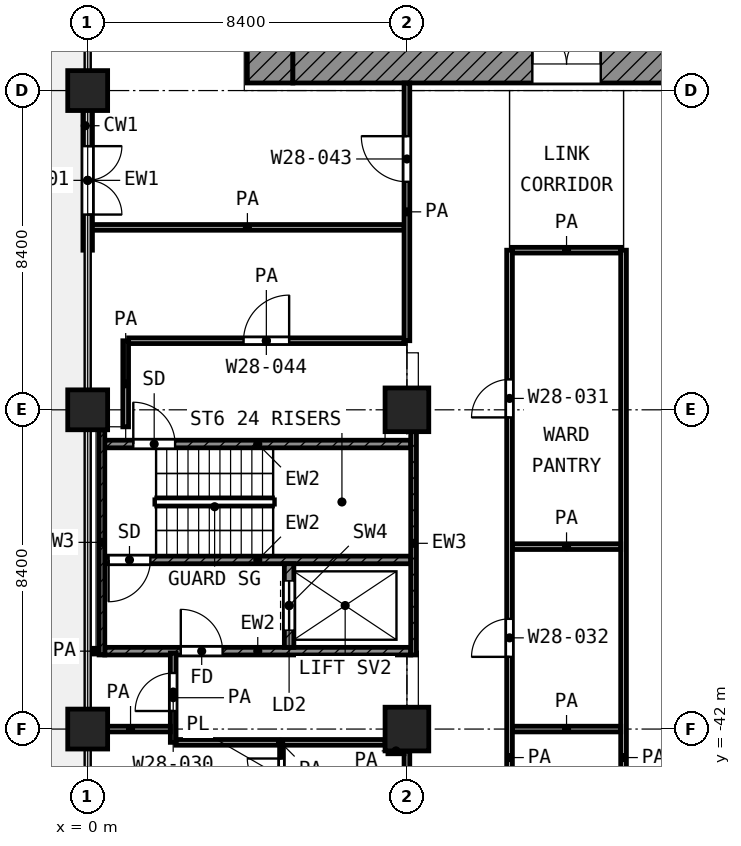
"""IFC4 building model, lengths in metres.
Left out: names, types, materials, properties, quantities, classifications, styles, units other than length and angle.
Written with IfcOpenShell. Run it as: python <this file> out.ifc"""

import sys

from ifc_helpers import new_model, si_unit, direction, frame, frame_2d, origin, origin_2d, place, context, subcontext, project, spatial, rectangle, extrude, element, fill, save


model = new_model("IFC4")
c1 = context("Model", 3, precision=1e-05, world=origin(), true_north=direction((0.0, 1.0)))
c2 = subcontext(c1, "Body", "Model", "MODEL_VIEW")
j1 = project(units=[si_unit("LENGTHUNIT", "METRE"), si_unit("PLANEANGLEUNIT", "RADIAN")], contexts=[c1])
p1 = place(None, origin())
s1 = spatial("IfcSite", under=j1, at=p1, CompositionType="ELEMENT")
p2 = place(p1, origin())
s2 = spatial("IfcBuilding", under=s1, at=p2, CompositionType="ELEMENT")
p3 = place(p2, frame((0.0, 0.0, 124.0)))
s3 = spatial("IfcBuildingStorey", under=s2, at=p3, CompositionType="ELEMENT", Elevation=124.0)
for number, where, z_axis, x_axis in (
    (1, (0.0, -25.2, 0.0), (0.0, 0.0, 1.0), (1.0, 0.0, 0.0)),
    (2, (0.0, -33.6, 0.0), (0.0, 0.0, 1.0), (1.0, 0.0, 0.0)),
):
    element("IfcColumn", number, at=place(p3, frame(where, z_axis=z_axis, x_axis=x_axis)), inside=s3, PredefinedType="COLUMN", context=c2, shape_type="SweptSolid", body=[
        extrude(rectangle(XDim=1.05, YDim=1.05, at=origin_2d()), origin(), (0.0, 0.0, 1.0), 4.2),
    ])
p4 = place(p3, frame((8.4, -33.6, 0.0), z_axis=(0.0, 0.0, 1.0), x_axis=(1.0, 0.0, 0.0)))
e3 = element("IfcColumn", 3, at=p4, inside=s3, PredefinedType="COLUMN", context=c2, shape_type="SweptSolid", body=[
    extrude(rectangle(XDim=1.15, YDim=1.15, at=origin_2d()), origin(), (0.0, 0.0, 1.0), 4.2),
])
p5 = place(p3, frame((0.0, -42.0, 0.0), z_axis=(0.0, 0.0, 1.0), x_axis=(1.0, 0.0, 0.0)))
e4 = element("IfcColumn", 4, at=p5, inside=s3, PredefinedType="COLUMN", context=c2, shape_type="SweptSolid", body=[
    extrude(rectangle(XDim=1.05, YDim=1.05, at=origin_2d()), origin(), (0.0, 0.0, 1.0), 4.2),
])
p6 = place(p3, frame((8.4, -42.0, 0.0), z_axis=(0.0, 0.0, 1.0), x_axis=(1.0, 0.0, 0.0)))
e5 = element("IfcColumn", 5, at=p6, inside=s3, PredefinedType="COLUMN", context=c2, shape_type="SweptSolid", body=[
    extrude(rectangle(XDim=1.15, YDim=1.15, at=origin_2d()), origin(), (0.0, 0.0, 1.0), 4.2),
])
p7 = place(p3, frame((0.0, -25.725, 0.0), z_axis=(0.0, 0.0, 1.0), x_axis=(0.0, -1.0, 0.0)))
e6 = element("IfcWall", 6, at=p7, inside=s3, PredefinedType="SOLIDWALL", context=c2, shape_type="SweptSolid", body=[
    extrude(rectangle(XDim=3.675, YDim=0.25, at=frame_2d((1.837, 0.0))), origin(), (0.0, 0.0, 1.0), 3.48),
])
p8 = place(p7, frame((0.938, 0.0, 0.0)))
e7 = element("IfcOpeningElement", 7, at=p8, cuts=e6, PredefinedType="OPENING", context=c2, shape_type="SweptSolid", body=[
    extrude(rectangle(XDim=1.8, YDim=2.1, at=frame_2d((0.9, 1.05))), frame((0.0, 0.135, 0.0), z_axis=(0.0, -1.0, 0.0), x_axis=(1.0, 0.0, 0.0)), (0.0, 0.0, 1.0), 0.27),
])
p9 = place(p3, frame((4.8, -25.0, 0.0), z_axis=(0.0, 0.0, 1.0), x_axis=(0.0, 1.0, 0.0)))
e8 = element("IfcWall", 8, at=p9, inside=s3, PredefinedType="SHEAR", context=c2, shape_type="SweptSolid", body=[
    extrude(rectangle(XDim=19.6, YDim=1.2, at=frame_2d((9.8, 0.0))), origin(), (0.0, 0.0, 1.0), 3.6),
])
p10 = place(p9, frame((11.45, 0.0, 0.0)))
e9 = element("IfcOpeningElement", 9, at=p10, cuts=e8, PredefinedType="OPENING", context=c2, shape_type="SweptSolid", body=[
    extrude(rectangle(XDim=1.1, YDim=2.1, at=frame_2d((0.55, 1.05))), frame((0.0, 0.61, 0.0), z_axis=(0.0, -1.0, 0.0), x_axis=(1.0, 0.0, 0.0)), (0.0, 0.0, 1.0), 1.22),
])
p11 = place(p9, frame((2.15, 0.0, 0.0)))
e10 = element("IfcOpeningElement", 10, at=p11, cuts=e8, PredefinedType="OPENING", context=c2, shape_type="SweptSolid", body=[
    extrude(rectangle(XDim=1.1, YDim=2.1, at=frame_2d((0.55, 1.05))), frame((0.0, 0.61, 0.0), z_axis=(0.0, -1.0, 0.0), x_axis=(1.0, 0.0, 0.0)), (0.0, 0.0, 1.0), 1.22),
])
p12 = place(p3, frame((5.4, -24.5, 0.0), z_axis=(0.0, 0.0, 1.0), x_axis=(1.0, 0.0, 0.0)))
e11 = element("IfcWall", 11, at=p12, inside=s3, PredefinedType="SHEAR", context=c2, shape_type="SweptSolid", body=[
    extrude(rectangle(XDim=18.6, YDim=1.0, at=frame_2d((9.3, 0.0))), origin(), (0.0, 0.0, 1.0), 3.6),
])
p13 = place(p12, frame((6.3, 0.0, 0.0)))
e12 = element("IfcOpeningElement", 12, at=p13, cuts=e11, PredefinedType="OPENING", context=c2, shape_type="SweptSolid", body=[
    extrude(rectangle(XDim=1.8, YDim=2.1, at=frame_2d((0.9, 1.05))), frame((0.0, 0.51, 0.0), z_axis=(0.0, -1.0, 0.0), x_axis=(1.0, 0.0, 0.0)), (0.0, 0.0, 1.0), 1.02),
])
p14 = place(p3, frame((0.375, -40.05, 0.0), z_axis=(0.0, 0.0, 1.0), x_axis=(0.0, 1.0, 0.0)))
e13 = element("IfcWall", 13, at=p14, inside=s3, PredefinedType="SHEAR", context=c2, shape_type="SweptSolid", body=[
    extrude(rectangle(XDim=5.925, YDim=0.15, at=frame_2d((2.962, 0.0))), origin(), (0.0, 0.0, 1.0), 3.6),
])
p15 = place(p3, frame((8.575, -40.05, 0.0), z_axis=(0.0, 0.0, 1.0), x_axis=(0.0, 1.0, 0.0)))
e14 = element("IfcWall", 14, at=p15, inside=s3, PredefinedType="SHEAR", context=c2, shape_type="SweptSolid", body=[
    extrude(rectangle(XDim=5.875, YDim=0.15, at=frame_2d((2.938, 0.0))), origin(), (0.0, 0.0, 1.0), 3.6),
])
p16 = place(p3, frame((0.45, -34.5, 0.0), z_axis=(0.0, 0.0, 1.0), x_axis=(1.0, 0.0, 0.0)))
e15 = element("IfcWall", 15, at=p16, inside=s3, PredefinedType="SHEAR", context=c2, shape_type="SweptSolid", body=[
    extrude(rectangle(XDim=8.05, YDim=0.2, at=frame_2d((4.025, 0.0))), origin(), (0.0, 0.0, 1.0), 3.6),
])
p17 = place(p16, frame((0.75, 0.0, 0.0)))
e16 = element("IfcOpeningElement", 16, at=p17, cuts=e15, PredefinedType="OPENING", context=c2, shape_type="SweptSolid", body=[
    extrude(rectangle(XDim=1.1, YDim=2.1, at=frame_2d((0.55, 1.05))), frame((0.0, 0.11, 0.0), z_axis=(0.0, -1.0, 0.0), x_axis=(1.0, 0.0, 0.0)), (0.0, 0.0, 1.0), 0.22),
])
p18 = place(p3, frame((0.45, -37.55, 0.0), z_axis=(0.0, 0.0, 1.0), x_axis=(1.0, 0.0, 0.0)))
e17 = element("IfcWall", 17, at=p18, inside=s3, PredefinedType="SHEAR", context=c2, shape_type="SweptSolid", body=[
    extrude(rectangle(XDim=8.05, YDim=0.2, at=frame_2d((4.025, 0.0))), origin(), (0.0, 0.0, 1.0), 3.6),
])
p19 = place(p18, frame((0.1, 0.0, 0.0)))
e18 = element("IfcOpeningElement", 18, at=p19, cuts=e17, PredefinedType="OPENING", context=c2, shape_type="SweptSolid", body=[
    extrude(rectangle(XDim=1.1, YDim=2.1, at=frame_2d((0.55, 1.05))), frame((0.0, 0.11, 0.0), z_axis=(0.0, -1.0, 0.0), x_axis=(1.0, 0.0, 0.0)), (0.0, 0.0, 1.0), 0.22),
])
p20 = place(p3, frame((0.45, -39.95, 0.0), z_axis=(0.0, 0.0, 1.0), x_axis=(1.0, 0.0, 0.0)))
e19 = element("IfcWall", 19, at=p20, inside=s3, PredefinedType="SHEAR", context=c2, shape_type="SweptSolid", body=[
    extrude(rectangle(XDim=8.05, YDim=0.2, at=frame_2d((4.025, 0.0))), origin(), (0.0, 0.0, 1.0), 3.6),
])
p21 = place(p20, frame((2.0, 0.0, 0.0)))
e20 = element("IfcOpeningElement", 20, at=p21, cuts=e19, PredefinedType="OPENING", context=c2, shape_type="SweptSolid", body=[
    extrude(rectangle(XDim=1.1, YDim=2.1, at=frame_2d((0.55, 1.05))), frame((0.0, 0.11, 0.0), z_axis=(0.0, -1.0, 0.0), x_axis=(1.0, 0.0, 0.0)), (0.0, 0.0, 1.0), 0.22),
])
p22 = place(p3, frame((5.3, -39.85, 0.0), z_axis=(0.0, 0.0, 1.0), x_axis=(0.0, 1.0, 0.0)))
e21 = element("IfcWall", 21, at=p22, inside=s3, PredefinedType="SHEAR", context=c2, shape_type="SweptSolid", body=[
    extrude(rectangle(XDim=2.2, YDim=0.25, at=frame_2d((1.1, 0.0))), origin(), (0.0, 0.0, 1.0), 3.6),
])
p23 = place(p22, frame((0.45, 0.0, 0.0)))
e22 = element("IfcOpeningElement", 22, at=p23, cuts=e21, PredefinedType="OPENING", context=c2, shape_type="SweptSolid", body=[
    extrude(rectangle(XDim=1.3, YDim=2.1, at=frame_2d((0.65, 1.05))), frame((0.0, 0.135, 0.0), z_axis=(0.0, -1.0, 0.0), x_axis=(1.0, 0.0, 0.0)), (0.0, 0.0, 1.0), 0.27),
])
p24 = place(p3, frame((5.1, -44.1, 0.0), z_axis=(0.0, 0.0, 1.0), x_axis=(0.0, 1.0, 0.0)))
e23 = element("IfcWall", 23, at=p24, inside=s3, PredefinedType="PARTITIONING", context=c2, shape_type="SweptSolid", body=[
    extrude(rectangle(XDim=1.675, YDim=0.1, at=frame_2d((0.837, 0.0))), origin(), (0.0, 0.0, 1.0), 3.6),
])
p25 = place(p24, frame((0.425, 0.0, 0.0)))
e24 = element("IfcOpeningElement", 24, at=p25, cuts=e23, PredefinedType="OPENING", context=c2, shape_type="SweptSolid", body=[
    extrude(rectangle(XDim=0.9, YDim=2.1, at=frame_2d((0.45, 1.05))), frame((0.0, 0.06, 0.0), z_axis=(0.0, -1.0, 0.0), x_axis=(1.0, 0.0, 0.0)), (0.0, 0.0, 1.0), 0.12),
])
p26 = place(p3, frame((7.9, -42.575, 0.0), z_axis=(0.0, 0.0, 1.0), x_axis=(1.0, 0.0, 0.0)))
e25 = element("IfcWall", 25, at=p26, inside=s3, PredefinedType="PARTITIONING", context=c2, shape_type="SweptSolid", body=[
    extrude(rectangle(XDim=0.425, YDim=0.15, at=frame_2d((0.212, 0.0))), origin(), (0.0, 0.0, 1.0), 3.6),
])
p27 = place(p3, frame((2.325, -42.35, 0.0), z_axis=(0.0, 0.0, 1.0), x_axis=(1.0, 0.0, 0.0)))
e26 = element("IfcWall", 26, at=p27, inside=s3, PredefinedType="PARTITIONING", context=c2, shape_type="SweptSolid", body=[
    extrude(rectangle(XDim=5.498, YDim=0.15, at=frame_2d((2.749, 0.0))), origin(), (0.0, 0.0, 1.0), 3.6),
])
p28 = place(p3, frame((0.08, -42.0, 0.0), z_axis=(0.0, 0.0, 1.0), x_axis=(1.0, 0.0, 0.0)))
e27 = element("IfcWall", 27, at=p28, inside=s3, PredefinedType="PARTITIONING", context=c2, shape_type="SweptSolid", body=[
    extrude(rectangle(XDim=2.095, YDim=0.15, at=frame_2d((1.047, 0.0))), origin(), (0.0, 0.0, 1.0), 3.6),
])
p29 = place(p3, frame((11.175, -42.0, 0.0), z_axis=(0.0, 0.0, 1.0), x_axis=(1.0, 0.0, 0.0)))
e28 = element("IfcWall", 28, at=p29, inside=s3, PredefinedType="PARTITIONING", context=c2, shape_type="SweptSolid", body=[
    extrude(rectangle(XDim=2.85, YDim=0.15, at=frame_2d((1.425, 0.0))), origin(), (0.0, 0.0, 1.0), 3.6),
])
p30 = place(p3, frame((0.08, -39.95, 0.0), z_axis=(0.0, 0.0, 1.0), x_axis=(1.0, 0.0, 0.0)))
e29 = element("IfcWall", 29, at=p30, inside=s3, PredefinedType="PARTITIONING", context=c2, shape_type="SweptSolid", body=[
    extrude(rectangle(XDim=0.19, YDim=0.15, at=frame_2d((0.095, 0.0))), origin(), (0.0, 0.0, 1.0), 3.6),
])
p31 = place(p3, frame((11.175, -37.2, 0.0), z_axis=(0.0, 0.0, 1.0), x_axis=(1.0, 0.0, 0.0)))
e30 = element("IfcWall", 30, at=p31, inside=s3, PredefinedType="PARTITIONING", context=c2, shape_type="SweptSolid", body=[
    extrude(rectangle(XDim=2.85, YDim=0.15, at=frame_2d((1.425, 0.0))), origin(), (0.0, 0.0, 1.0), 3.6),
])
p32 = place(p3, frame((1.077, -31.782, 0.0), z_axis=(0.0, 0.0, 1.0), x_axis=(1.0, 0.0, 0.0)))
e31 = element("IfcWall", 31, at=p32, inside=s3, PredefinedType="PARTITIONING", context=c2, shape_type="SweptSolid", body=[
    extrude(rectangle(XDim=7.248, YDim=0.15, at=frame_2d((3.624, 0.0))), origin(), (0.0, 0.0, 1.0), 3.6),
])
p33 = place(p32, frame((3.024, 0.0, 0.0)))
e32 = element("IfcOpeningElement", 32, at=p33, cuts=e31, PredefinedType="OPENING", context=c2, shape_type="SweptSolid", body=[
    extrude(rectangle(XDim=1.2, YDim=2.1, at=frame_2d((0.6, 1.05))), frame((0.0, 0.085, 0.0), z_axis=(0.0, -1.0, 0.0), x_axis=(1.0, 0.0, 0.0)), (0.0, 0.0, 1.0), 0.17),
])
p34 = place(p3, frame((11.175, -29.4, 0.0), z_axis=(0.0, 0.0, 1.0), x_axis=(1.0, 0.0, 0.0)))
e33 = element("IfcWall", 33, at=p34, inside=s3, PredefinedType="PARTITIONING", context=c2, shape_type="SweptSolid", body=[
    extrude(rectangle(XDim=2.85, YDim=0.15, at=frame_2d((1.425, 0.0))), origin(), (0.0, 0.0, 1.0), 3.6),
])
p35 = place(p3, frame((0.08, -28.8, 0.0), z_axis=(0.0, 0.0, 1.0), x_axis=(1.0, 0.0, 0.0)))
e34 = element("IfcWall", 34, at=p35, inside=s3, PredefinedType="PARTITIONING", context=c2, shape_type="SweptSolid", body=[
    extrude(rectangle(XDim=8.245, YDim=0.15, at=frame_2d((4.123, 0.0))), origin(), (0.0, 0.0, 1.0), 3.6),
])
p36 = place(p3, frame((1.0, -34.048, 0.0), z_axis=(0.0, 0.0, 1.0), x_axis=(0.0, 1.0, 0.0)))
e35 = element("IfcWall", 35, at=p36, inside=s3, PredefinedType="PARTITIONING", context=c2, shape_type="SweptSolid", body=[
    extrude(rectangle(XDim=2.265, YDim=0.15, at=frame_2d((1.133, 0.0))), origin(), (0.0, 0.0, 1.0), 3.6),
])
p37 = place(p3, frame((2.25, -42.35, 0.0), z_axis=(0.0, 0.0, 1.0), x_axis=(0.0, 1.0, 0.0)))
e36 = element("IfcWall", 36, at=p37, inside=s3, PredefinedType="PARTITIONING", context=c2, shape_type="SweptSolid", body=[
    extrude(rectangle(XDim=2.35, YDim=0.15, at=frame_2d((1.175, 0.0))), origin(), (0.0, 0.0, 1.0), 3.6),
])
p38 = place(p37, frame((0.825, 0.0, 0.0)))
e37 = element("IfcOpeningElement", 37, at=p38, cuts=e36, PredefinedType="OPENING", context=c2, shape_type="SweptSolid", body=[
    extrude(rectangle(XDim=1.0, YDim=2.1, at=frame_2d((0.5, 1.05))), frame((0.0, 0.085, 0.0), z_axis=(0.0, -1.0, 0.0), x_axis=(1.0, 0.0, 0.0)), (0.0, 0.0, 1.0), 0.17),
])
p39 = place(p3, frame((8.4, -58.72, 0.0), z_axis=(0.0, 0.0, 1.0), x_axis=(0.0, 1.0, 0.0)))
e38 = element("IfcWall", 38, at=p39, inside=s3, PredefinedType="PARTITIONING", context=c2, shape_type="SweptSolid", body=[
    extrude(rectangle(XDim=16.145, YDim=0.15, at=frame_2d((8.073, 0.0))), origin(), (0.0, 0.0, 1.0), 2.7),
])
p40 = place(p39, frame((9.82, 0.0, 0.0)))
e39 = element("IfcOpeningElement", 39, at=p40, cuts=e38, PredefinedType="OPENING", context=c2, shape_type="SweptSolid", body=[
    extrude(rectangle(XDim=1.2, YDim=2.1, at=frame_2d((0.6, 1.05))), frame((0.0, 0.085, 0.0), z_axis=(0.0, -1.0, 0.0), x_axis=(1.0, 0.0, 0.0)), (0.0, 0.0, 1.0), 0.17),
])
p41 = place(p39, frame((11.92, 0.0, 0.0)))
e40 = element("IfcOpeningElement", 40, at=p41, cuts=e38, PredefinedType="OPENING", context=c2, shape_type="SweptSolid", body=[
    extrude(rectangle(XDim=1.2, YDim=2.1, at=frame_2d((0.6, 1.05))), frame((0.0, 0.085, 0.0), z_axis=(0.0, -1.0, 0.0), x_axis=(1.0, 0.0, 0.0)), (0.0, 0.0, 1.0), 0.17),
])
p42 = place(p39, frame((3.37, 0.0, 0.0)))
e41 = element("IfcOpeningElement", 41, at=p42, cuts=e38, PredefinedType="OPENING", context=c2, shape_type="SweptSolid", body=[
    extrude(rectangle(XDim=1.5, YDim=2.1, at=frame_2d((0.75, 1.05))), frame((0.0, 0.085, 0.0), z_axis=(0.0, -1.0, 0.0), x_axis=(1.0, 0.0, 0.0)), (0.0, 0.0, 1.0), 0.17),
])
p43 = place(p3, frame((8.4, -31.782, 0.0), z_axis=(0.0, 0.0, 1.0), x_axis=(0.0, 1.0, 0.0)))
e42 = element("IfcWall", 42, at=p43, inside=s3, PredefinedType="PARTITIONING", context=c2, shape_type="SweptSolid", body=[
    extrude(rectangle(XDim=6.782, YDim=0.15, at=frame_2d((3.391, 0.0))), origin(), (0.0, 0.0, 1.0), 3.6),
])
p44 = place(p43, frame((4.182, 0.0, 0.0)))
e43 = element("IfcOpeningElement", 43, at=p44, cuts=e42, PredefinedType="OPENING", context=c2, shape_type="SweptSolid", body=[
    extrude(rectangle(XDim=1.2, YDim=2.1, at=frame_2d((0.6, 1.05))), frame((0.0, 0.085, 0.0), z_axis=(0.0, -1.0, 0.0), x_axis=(1.0, 0.0, 0.0)), (0.0, 0.0, 1.0), 0.17),
])
p45 = place(p3, frame((11.1, -56.1, 0.0), z_axis=(0.0, 0.0, 1.0), x_axis=(0.0, 1.0, 0.0)))
e44 = element("IfcWall", 44, at=p45, inside=s3, PredefinedType="PARTITIONING", context=c2, shape_type="SweptSolid", body=[
    extrude(rectangle(XDim=26.7, YDim=0.15, at=frame_2d((13.35, 0.0))), origin(), (0.0, 0.0, 1.0), 3.6),
])
p46 = place(p45, frame((22.3, 0.0, 0.0)))
e45 = element("IfcOpeningElement", 45, at=p46, cuts=e44, PredefinedType="OPENING", context=c2, shape_type="SweptSolid", body=[
    extrude(rectangle(XDim=1.0, YDim=2.1, at=frame_2d((0.5, 1.05))), frame((0.0, 0.085, 0.0), z_axis=(0.0, -1.0, 0.0), x_axis=(1.0, 0.0, 0.0)), (0.0, 0.0, 1.0), 0.17),
])
p47 = place(p45, frame((16.0, 0.0, 0.0)))
e46 = element("IfcOpeningElement", 46, at=p47, cuts=e44, PredefinedType="OPENING", context=c2, shape_type="SweptSolid", body=[
    extrude(rectangle(XDim=1.0, YDim=2.1, at=frame_2d((0.5, 1.05))), frame((0.0, 0.085, 0.0), z_axis=(0.0, -1.0, 0.0), x_axis=(1.0, 0.0, 0.0)), (0.0, 0.0, 1.0), 0.17),
])
p48 = place(p45, frame((6.45, 0.0, 0.0)))
e47 = element("IfcOpeningElement", 47, at=p48, cuts=e44, PredefinedType="OPENING", context=c2, shape_type="SweptSolid", body=[
    extrude(rectangle(XDim=1.2, YDim=2.1, at=frame_2d((0.6, 1.05))), frame((0.0, 0.085, 0.0), z_axis=(0.0, -1.0, 0.0), x_axis=(1.0, 0.0, 0.0)), (0.0, 0.0, 1.0), 0.17),
])
p49 = place(p3, frame((14.1, -56.1, 0.0), z_axis=(0.0, 0.0, 1.0), x_axis=(0.0, 1.0, 0.0)))
e48 = element("IfcWall", 48, at=p49, inside=s3, PredefinedType="PARTITIONING", context=c2, shape_type="SweptSolid", body=[
    extrude(rectangle(XDim=26.7, YDim=0.15, at=frame_2d((13.35, 0.0))), origin(), (0.0, 0.0, 1.0), 3.6),
])
p50 = place(p8, origin())
e49 = element("IfcDoor", 49, at=p50, inside=s3, OperationType="DOUBLE_DOOR_SINGLE_SWING", PredefinedType="DOOR", context=c2, shape_type="SweptSolid", body=[
    extrude(rectangle(XDim=1.8, YDim=2.1, at=frame_2d((0.9, 1.05))), frame((0.0, 0.025, 0.0), z_axis=(0.0, -1.0, 0.0), x_axis=(1.0, 0.0, 0.0)), (0.0, 0.0, 1.0), 0.05),
])
fill(e7, e49)
p51 = place(p13, origin())
e50 = element("IfcDoor", 50, at=p51, inside=s3, OperationType="DOUBLE_DOOR_SINGLE_SWING", PredefinedType="DOOR", context=c2, shape_type="SweptSolid", body=[
    extrude(rectangle(XDim=1.8, YDim=2.1, at=frame_2d((0.9, 1.05))), frame((0.0, 0.025, 0.0), z_axis=(0.0, -1.0, 0.0), x_axis=(1.0, 0.0, 0.0)), (0.0, 0.0, 1.0), 0.05),
])
fill(e12, e50)
p52 = place(p17, origin())
e51 = element("IfcDoor", 51, at=p52, inside=s3, OperationType="SINGLE_SWING_LEFT", PredefinedType="DOOR", context=c2, shape_type="SweptSolid", body=[
    extrude(rectangle(XDim=1.1, YDim=2.1, at=frame_2d((0.55, 1.05))), frame((0.0, 0.025, 0.0), z_axis=(0.0, -1.0, 0.0), x_axis=(1.0, 0.0, 0.0)), (0.0, 0.0, 1.0), 0.05),
])
fill(e16, e51)
p53 = place(p19, frame((1.1, 0.0, 0.0), z_axis=(0.0, 0.0, 1.0), x_axis=(-1.0, 0.0, 0.0)))
e52 = element("IfcDoor", 52, at=p53, inside=s3, OperationType="SINGLE_SWING_LEFT", PredefinedType="DOOR", context=c2, shape_type="SweptSolid", body=[
    extrude(rectangle(XDim=1.1, YDim=2.1, at=frame_2d((0.55, 1.05))), frame((0.0, 0.025, 0.0), z_axis=(0.0, -1.0, 0.0), x_axis=(1.0, 0.0, 0.0)), (0.0, 0.0, 1.0), 0.05),
])
fill(e18, e52)
p54 = place(p23, origin())
e53 = element("IfcDoor", 53, at=p54, inside=s3, OperationType="DOUBLE_DOOR_SLIDING", PredefinedType="DOOR", context=c2, shape_type="SweptSolid", body=[
    extrude(rectangle(XDim=1.3, YDim=2.1, at=frame_2d((0.65, 1.05))), frame((0.0, 0.025, 0.0), z_axis=(0.0, -1.0, 0.0), x_axis=(1.0, 0.0, 0.0)), (0.0, 0.0, 1.0), 0.05),
])
fill(e22, e53)
p55 = place(p21, origin())
e54 = element("IfcDoor", 54, at=p55, inside=s3, OperationType="SINGLE_SWING_LEFT", PredefinedType="DOOR", context=c2, shape_type="SweptSolid", body=[
    extrude(rectangle(XDim=1.1, YDim=2.1, at=frame_2d((0.55, 1.05))), frame((0.0, 0.025, 0.0), z_axis=(0.0, -1.0, 0.0), x_axis=(1.0, 0.0, 0.0)), (0.0, 0.0, 1.0), 0.05),
])
fill(e20, e54)
p56 = place(p44, origin())
e55 = element("IfcDoor", 55, at=p56, inside=s3, OperationType="SINGLE_SWING_RIGHT", PredefinedType="DOOR", context=c2, shape_type="SweptSolid", body=[
    extrude(rectangle(XDim=1.2, YDim=2.1, at=frame_2d((0.6, 1.05))), frame((0.0, 0.025, 0.0), z_axis=(0.0, -1.0, 0.0), x_axis=(1.0, 0.0, 0.0)), (0.0, 0.0, 1.0), 0.05),
])
fill(e43, e55)
p57 = place(p33, origin())
e56 = element("IfcDoor", 56, at=p57, inside=s3, OperationType="SINGLE_SWING_RIGHT", PredefinedType="DOOR", context=c2, shape_type="SweptSolid", body=[
    extrude(rectangle(XDim=1.2, YDim=2.1, at=frame_2d((0.6, 1.05))), frame((0.0, 0.025, 0.0), z_axis=(0.0, -1.0, 0.0), x_axis=(1.0, 0.0, 0.0)), (0.0, 0.0, 1.0), 0.05),
])
fill(e32, e56)
p58 = place(p38, origin())
e57 = element("IfcDoor", 57, at=p58, inside=s3, OperationType="SINGLE_SWING_LEFT", PredefinedType="DOOR", context=c2, shape_type="SweptSolid", body=[
    extrude(rectangle(XDim=1.0, YDim=2.1, at=frame_2d((0.5, 1.05))), frame((0.0, 0.025, 0.0), z_axis=(0.0, -1.0, 0.0), x_axis=(1.0, 0.0, 0.0)), (0.0, 0.0, 1.0), 0.05),
])
fill(e37, e57)
p59 = place(p25, origin())
e58 = element("IfcDoor", 58, at=p59, inside=s3, OperationType="SINGLE_SWING_RIGHT", PredefinedType="DOOR", context=c2, shape_type="SweptSolid", body=[
    extrude(rectangle(XDim=0.9, YDim=2.1, at=frame_2d((0.45, 1.05))), frame((0.0, 0.025, 0.0), z_axis=(0.0, -1.0, 0.0), x_axis=(1.0, 0.0, 0.0)), (0.0, 0.0, 1.0), 0.05),
])
fill(e24, e58)
p60 = place(p46, origin())
e59 = element("IfcDoor", 59, at=p60, inside=s3, OperationType="SINGLE_SWING_LEFT", PredefinedType="DOOR", context=c2, shape_type="SweptSolid", body=[
    extrude(rectangle(XDim=1.0, YDim=2.1, at=frame_2d((0.5, 1.05))), frame((0.0, 0.025, 0.0), z_axis=(0.0, -1.0, 0.0), x_axis=(1.0, 0.0, 0.0)), (0.0, 0.0, 1.0), 0.05),
])
fill(e45, e59)
p61 = place(p47, origin())
e60 = element("IfcDoor", 60, at=p61, inside=s3, OperationType="SINGLE_SWING_LEFT", PredefinedType="DOOR", context=c2, shape_type="SweptSolid", body=[
    extrude(rectangle(XDim=1.0, YDim=2.1, at=frame_2d((0.5, 1.05))), frame((0.0, 0.025, 0.0), z_axis=(0.0, -1.0, 0.0), x_axis=(1.0, 0.0, 0.0)), (0.0, 0.0, 1.0), 0.05),
])
fill(e46, e60)
save(model, sys.argv[1])
